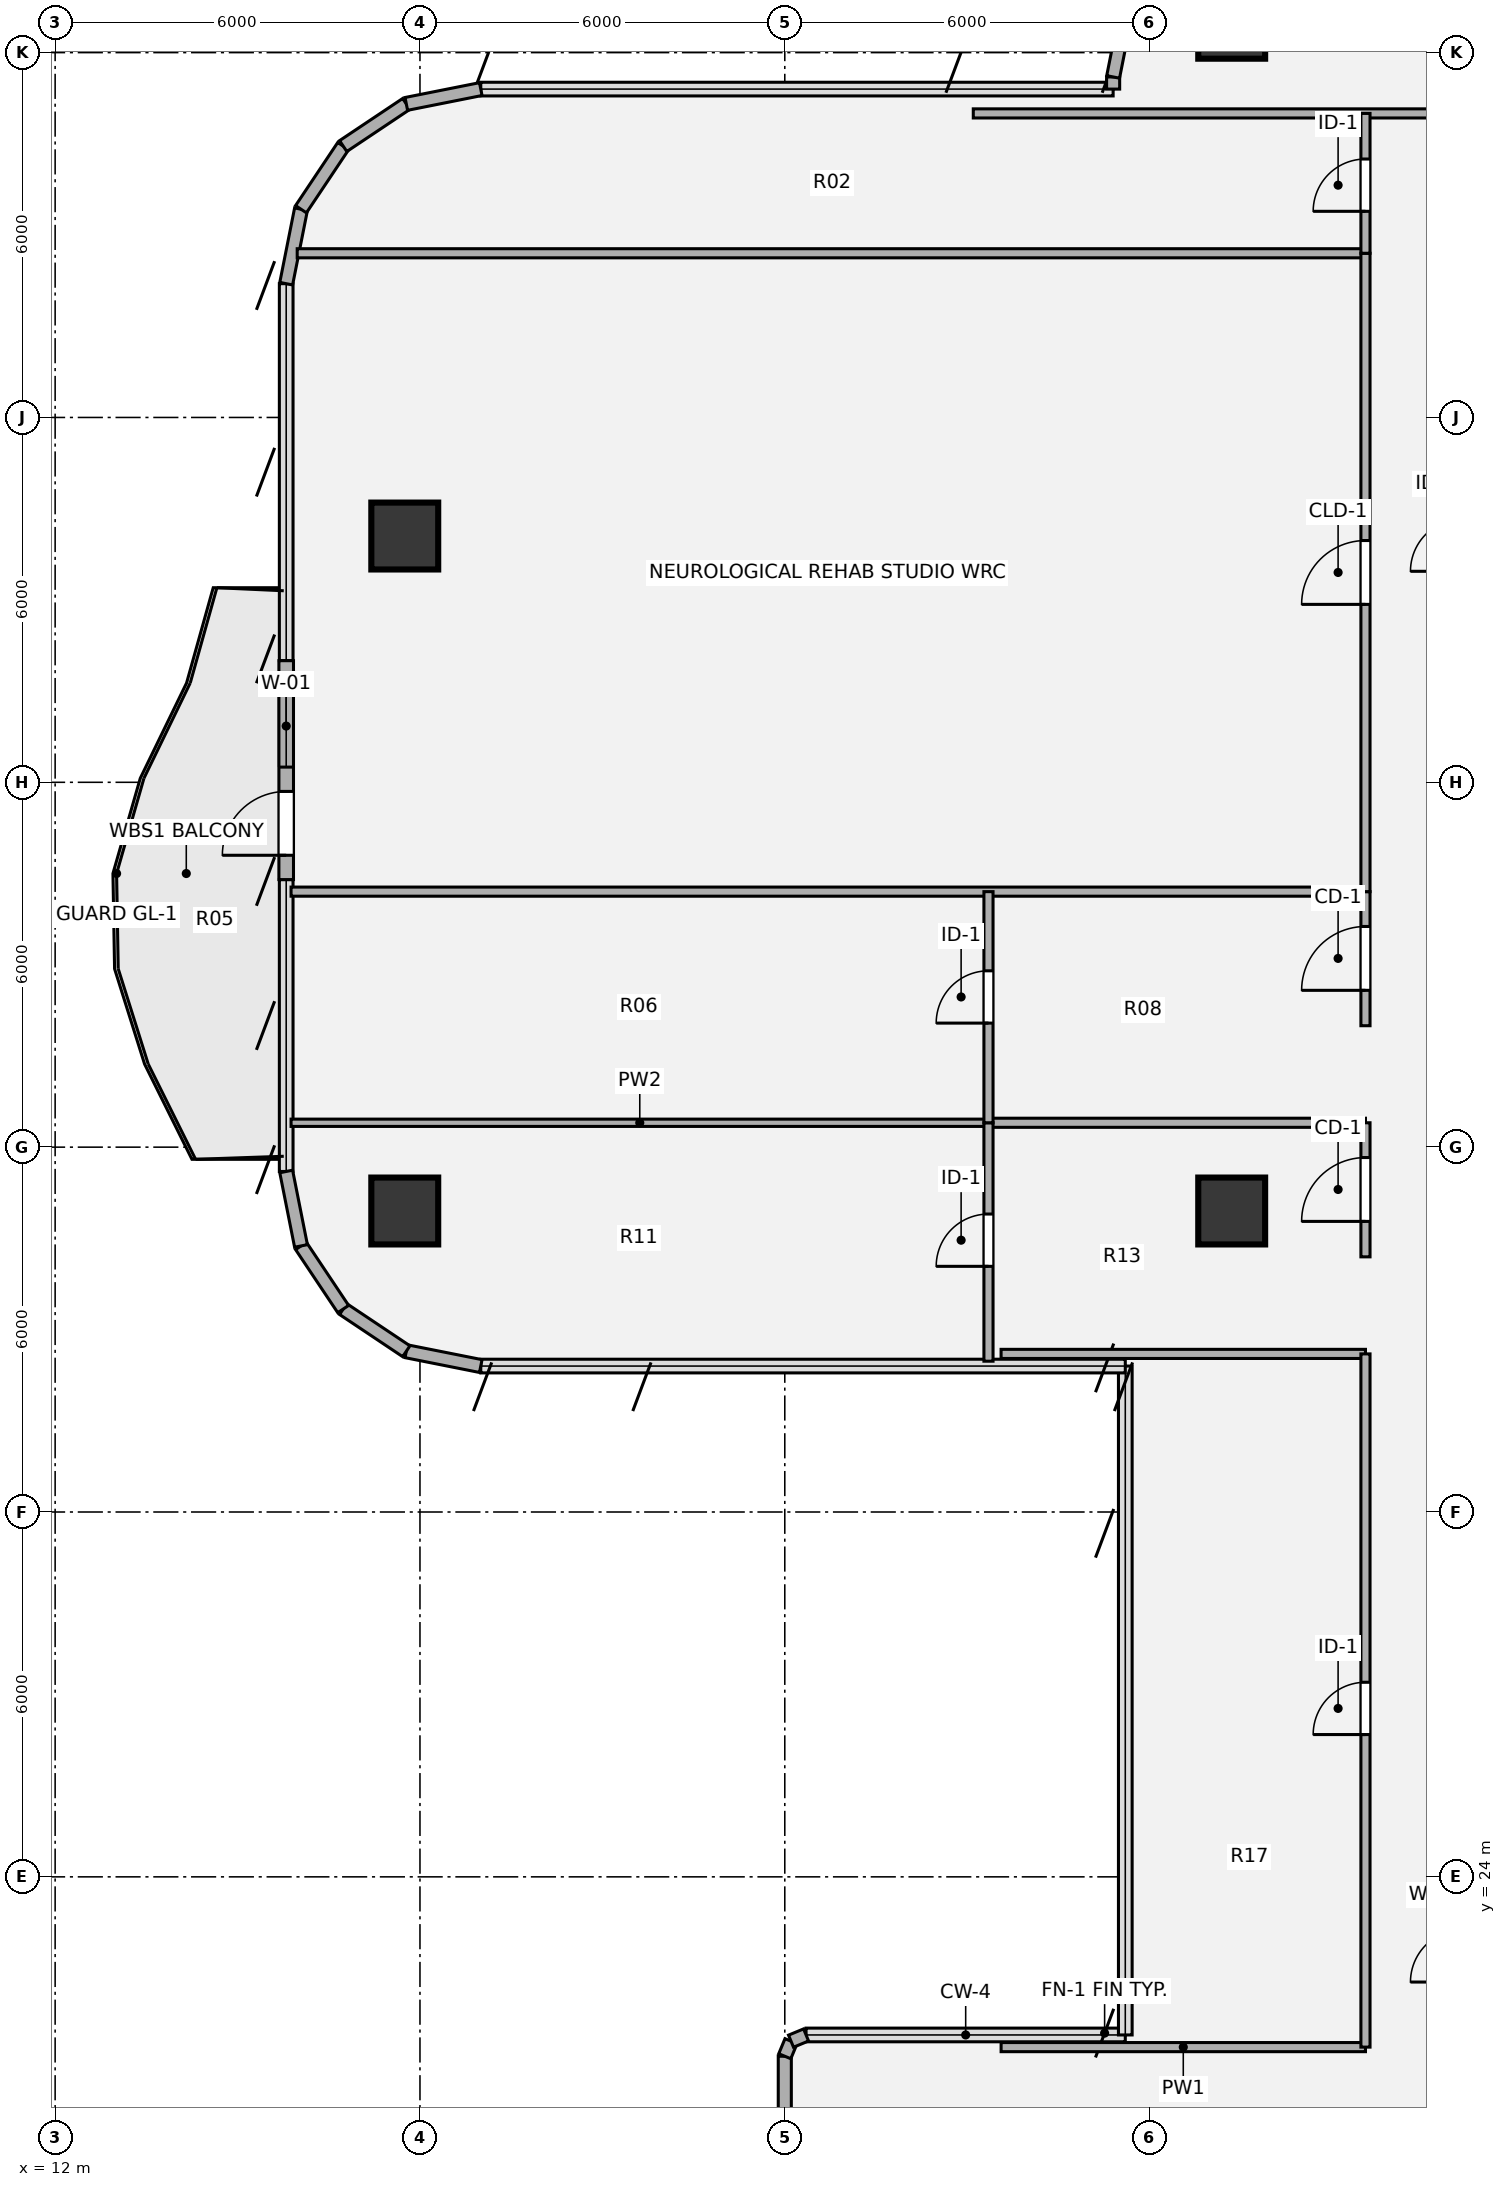
"""IFC4 building model, lengths in metres.
Left out: names, types, materials, properties, quantities, classifications, styles, units other than length and angle.
Written with IfcOpenShell. Run it as: python <this file> out.ifc"""

import sys

from ifc_helpers import new_model, si_unit, direction, frame, frame_2d, origin, origin_2d, place, context, subcontext, project, spatial, rectangle, hollow_circle, extrude, source, transform, mapped, element, fill, save


model = new_model("IFC4")
c1 = context("Model", 3, precision=1e-05, world=origin(), true_north=direction((0.0, 1.0)))
c2 = subcontext(c1, "Body", "Model", "MODEL_VIEW")
j1 = project(units=[si_unit("LENGTHUNIT", "METRE"), si_unit("PLANEANGLEUNIT", "RADIAN")], contexts=[c1])
p1 = place(None, origin())
s1 = spatial("IfcSite", under=j1, at=p1, CompositionType="ELEMENT")
p2 = place(p1, origin())
s2 = spatial("IfcBuilding", under=s1, at=p2, CompositionType="ELEMENT")
p3 = place(p2, frame((0.0, 0.0, 179.1)))
s3 = spatial("IfcBuildingStorey", under=s2, at=p3, CompositionType="ELEMENT", Elevation=179.1)
m1 = source(origin(), c2, "Body", "SweptSolid", [
    extrude(hollow_circle(Radius=0.55, WallThickness=0.04, at=origin_2d()), origin(), (0.0, 0.0, 1.0), 3.78),
])
for number, where, z_axis, x_axis in (
    (1, (17.75, 34.95, 0.0), (0.0, 0.0, 1.0), (1.0, 0.0, 0.0)),
    (2, (17.75, 46.05, 0.0), (0.0, 0.0, 1.0), (1.0, 0.0, 0.0)),
    (3, (31.35, 34.95, 0.0), (0.0, 0.0, 1.0), (1.0, 0.0, 0.0)),
    (4, (31.35, 54.45, 0.0), (0.0, 0.0, 1.0), (1.0, 0.0, 0.0)),
):
    element("IfcColumn", number, at=place(p3, frame(where, z_axis=z_axis, x_axis=x_axis)), inside=s3, PredefinedType="COLUMN", context=c2, shape_type="MappedRepresentation", body=[
        mapped(m1, transform((0.0, 0.0, 0.0), x_axis=(1.0, 0.0, 0.0), y_axis=(0.0, 1.0, 0.0), z_axis=(0.0, 0.0, 1.0), scale=1.0)),
    ])
p4 = place(p3, frame((24.0, 18.355, 0.0), z_axis=(0.0, 0.0, 1.0), x_axis=(0.0, 1.0, 0.0)))
e5 = element("IfcWall", 5, at=p4, inside=s3, PredefinedType="SOLIDWALL", context=c2, shape_type="SweptSolid", body=[
    extrude(rectangle(XDim=2.695, YDim=0.215, at=frame_2d((1.348, 0.0))), origin(), (0.0, 0.0, 1.0), 2.718),
])
p5 = place(p3, frame((24.0, 21.05, 0.0), z_axis=(0.0, 0.0, 1.0), x_axis=(0.382673670509, 0.923883575944, 0.0)))
e6 = element("IfcWall", 6, at=p5, inside=s3, PredefinedType="SOLIDWALL", context=c2, shape_type="SweptSolid", body=[
    extrude(rectangle(XDim=0.268, YDim=0.215, at=frame_2d((0.134, 0.0))), origin(), (0.0, 0.0, 1.0), 3.53),
])
p6 = place(p3, frame((24.103, 21.298, 0.0), z_axis=(0.0, 0.0, 1.0), x_axis=(0.924205486139, 0.381895560841, 0.0)))
e7 = element("IfcWall", 7, at=p6, inside=s3, PredefinedType="SOLIDWALL", context=c2, shape_type="SweptSolid", body=[
    extrude(rectangle(XDim=0.268, YDim=0.215, at=frame_2d((0.134, 0.0))), origin(), (0.0, 0.0, 1.0), 3.53),
])
for number, where, z_axis, x_axis in (
    (8, (19.0, 32.4, 0.0), (0.0, 0.0, 1.0), (-0.981, 0.195, 0.0)),
    (9, (17.775, 32.644, 0.0), (0.0, 0.0, 1.0), (-0.831, 0.556, 0.0)),
    (10, (16.737, 33.337, 0.0), (0.0, 0.0, 1.0), (-0.556, 0.831, 0.0)),
    (11, (16.044, 34.375, 0.0), (0.0, 0.0, 1.0), (-0.195, 0.981, 0.0)),
):
    element("IfcWall", number, at=place(p3, frame(where, z_axis=z_axis, x_axis=x_axis)), inside=s3, PredefinedType="SOLIDWALL", context=c2, shape_type="SweptSolid", body=[
        extrude(rectangle(XDim=1.249, YDim=0.215, at=frame_2d((0.624, 0.0))), origin(), (0.0, 0.0, 1.0), 3.53),
    ])
p7 = place(p3, frame((15.8, 40.4, 0.0), z_axis=(0.0, 0.0, 1.0), x_axis=(0.0, 1.0, 0.0)))
e12 = element("IfcWall", 12, at=p7, inside=s3, PredefinedType="SOLIDWALL", context=c2, shape_type="SweptSolid", body=[
    extrude(rectangle(XDim=3.6, YDim=0.24, at=frame_2d((1.8, 0.0))), origin(), (0.0, 0.0, 1.0), 3.53),
])
p8 = place(p7, frame((0.4, 0.0, 0.0)))
e13 = element("IfcOpeningElement", 13, at=p8, cuts=e12, PredefinedType="OPENING", context=c2, shape_type="SweptSolid", body=[
    extrude(rectangle(XDim=1.05, YDim=2.15, at=origin_2d()), frame((0.525, 0.13, 1.075), z_axis=(0.0, -1.0, 0.0), x_axis=(1.0, 0.0, 0.0)), (0.0, 0.0, 1.0), 0.26),
])
p9 = place(p7, frame((1.85, 0.0, 0.85)))
e14 = element("IfcOpeningElement", 14, at=p9, cuts=e12, PredefinedType="OPENING", context=c2, shape_type="SweptSolid", body=[
    extrude(rectangle(XDim=1.35, YDim=1.35, at=origin_2d()), frame((0.675, 0.13, 0.675), z_axis=(0.0, -1.0, 0.0), x_axis=(1.0, 0.0, 0.0)), (0.0, 0.0, 1.0), 0.26),
])
for number, where, z_axis, x_axis in (
    (15, (15.8, 50.2, 0.0), (0.0, 0.0, 1.0), (0.195, 0.981, 0.0)),
    (16, (16.044, 51.425, 0.0), (0.0, 0.0, 1.0), (0.556, 0.831, 0.0)),
    (17, (16.737, 52.463, 0.0), (0.0, 0.0, 1.0), (0.831, 0.556, 0.0)),
    (18, (17.775, 53.156, 0.0), (0.0, 0.0, 1.0), (0.981, 0.195, 0.0)),
):
    element("IfcWall", number, at=place(p3, frame(where, z_axis=z_axis, x_axis=x_axis)), inside=s3, PredefinedType="SOLIDWALL", context=c2, shape_type="SweptSolid", body=[
        extrude(rectangle(XDim=1.249, YDim=0.215, at=frame_2d((0.624, 0.0))), origin(), (0.0, 0.0, 1.0), 3.53),
    ])
p10 = place(p3, frame((29.4, 53.4, 0.0), z_axis=(0.0, 0.0, 1.0), x_axis=(0.0, 1.0, 0.0)))
e19 = element("IfcWall", 19, at=p10, inside=s3, PredefinedType="SOLIDWALL", context=c2, shape_type="SweptSolid", body=[
    extrude(rectangle(XDim=0.2, YDim=0.215, at=frame_2d((0.1, 0.0))), origin(), (0.0, 0.0, 1.0), 3.53),
])
p11 = place(p3, frame((29.4, 53.6, 0.0), z_axis=(0.0, 0.0, 1.0), x_axis=(0.195127417394, 0.980777900945, 0.0)))
e20 = element("IfcWall", 20, at=p11, inside=s3, PredefinedType="SOLIDWALL", context=c2, shape_type="SweptSolid", body=[
    extrude(rectangle(XDim=1.092, YDim=0.215, at=frame_2d((0.546, 0.0))), origin(), (0.0, 0.0, 1.0), 3.53),
])
p12 = place(p3, frame((27.558, 21.2, 0.0), z_axis=(0.0, 0.0, 1.0), x_axis=(1.0, 0.0, 0.0)))
e21 = element("IfcWall", 21, at=p12, inside=s3, PredefinedType="PARTITIONING", context=c2, shape_type="SweptSolid", body=[
    extrude(rectangle(XDim=5.992, YDim=0.15, at=frame_2d((2.996, 0.0))), origin(), (0.0, 0.0, 1.0), 3.5),
])
p13 = place(p3, frame((27.557, 32.6, 0.0), z_axis=(0.0, 0.0, 1.0), x_axis=(1.0, 0.0, 0.0)))
e22 = element("IfcWall", 22, at=p13, inside=s3, PredefinedType="PARTITIONING", context=c2, shape_type="SweptSolid", body=[
    extrude(rectangle(XDim=5.993, YDim=0.15, at=frame_2d((2.997, 0.0))), origin(), (0.0, 0.0, 1.0), 3.5),
])
p14 = place(p3, frame((15.88, 36.401, 0.0), z_axis=(0.0, 0.0, 1.0), x_axis=(1.0, 0.0, 0.0)))
e23 = element("IfcWall", 23, at=p14, inside=s3, PredefinedType="PARTITIONING", context=c2, shape_type="SweptSolid", body=[
    extrude(rectangle(XDim=11.47, YDim=0.12, at=frame_2d((5.735, 0.0))), origin(), (0.0, 0.0, 1.0), 2.982),
])
p15 = place(p3, frame((27.35, 36.401, 0.0), z_axis=(0.0, 0.0, 1.0), x_axis=(1.0, 0.0, 0.0)))
e24 = element("IfcWall", 24, at=p15, inside=s3, PredefinedType="PARTITIONING", context=c2, shape_type="SweptSolid", body=[
    extrude(rectangle(XDim=6.2, YDim=0.15, at=frame_2d((3.1, 0.0))), origin(), (0.0, 0.0, 1.0), 2.982),
])
p16 = place(p3, frame((15.88, 40.202, 0.0), z_axis=(0.0, 0.0, 1.0), x_axis=(1.0, 0.0, 0.0)))
e25 = element("IfcWall", 25, at=p16, inside=s3, PredefinedType="PARTITIONING", context=c2, shape_type="SweptSolid", body=[
    extrude(rectangle(XDim=17.67, YDim=0.15, at=frame_2d((8.835, 0.0))), origin(), (0.0, 0.0, 1.0), 2.982),
])
p17 = place(p3, frame((15.981, 50.7, 0.0), z_axis=(0.0, 0.0, 1.0), x_axis=(1.0, 0.0, 0.0)))
e26 = element("IfcWall", 26, at=p17, inside=s3, PredefinedType="PARTITIONING", context=c2, shape_type="SweptSolid", body=[
    extrude(rectangle(XDim=17.569, YDim=0.15, at=frame_2d((8.785, 0.0))), origin(), (0.0, 0.0, 1.0), 3.308),
])
p18 = place(p3, frame((27.1, 53.0, 0.0), z_axis=(0.0, 0.0, 1.0), x_axis=(1.0, 0.0, 0.0)))
e27 = element("IfcWall", 27, at=p18, inside=s3, PredefinedType="PARTITIONING", context=c2, shape_type="SweptSolid", body=[
    extrude(rectangle(XDim=17.8, YDim=0.15, at=frame_2d((8.9, 0.0))), origin(), (0.0, 0.0, 1.0), 3.308),
])
p19 = place(p18, frame((8.375, 0.0, 0.0)))
e28 = element("IfcOpeningElement", 28, at=p19, cuts=e27, PredefinedType="OPENING", context=c2, shape_type="SweptSolid", body=[
    extrude(rectangle(XDim=1.05, YDim=2.1, at=origin_2d()), frame((0.525, 0.085, 1.05), z_axis=(0.0, -1.0, 0.0), x_axis=(1.0, 0.0, 0.0)), (0.0, 0.0, 1.0), 0.17),
])
p20 = place(p3, frame((27.35, 32.48, 0.0), z_axis=(0.0, 0.0, 1.0), x_axis=(0.0, 1.0, 0.0)))
e29 = element("IfcWall", 29, at=p20, inside=s3, PredefinedType="PARTITIONING", context=c2, shape_type="SweptSolid", body=[
    extrude(rectangle(XDim=3.921, YDim=0.15, at=frame_2d((1.96, 0.0))), origin(), (0.0, 0.0, 1.0), 3.5),
])
p21 = place(p20, frame((1.56, 0.0, 0.0)))
e30 = element("IfcOpeningElement", 30, at=p21, cuts=e29, PredefinedType="OPENING", context=c2, shape_type="SweptSolid", body=[
    extrude(rectangle(XDim=0.86, YDim=2.1, at=origin_2d()), frame((0.43, 0.085, 1.05), z_axis=(0.0, -1.0, 0.0), x_axis=(1.0, 0.0, 0.0)), (0.0, 0.0, 1.0), 0.17),
])
p22 = place(p3, frame((27.35, 36.401, 0.0), z_axis=(0.0, 0.0, 1.0), x_axis=(0.0, 1.0, 0.0)))
e31 = element("IfcWall", 31, at=p22, inside=s3, PredefinedType="PARTITIONING", context=c2, shape_type="SweptSolid", body=[
    extrude(rectangle(XDim=3.801, YDim=0.15, at=frame_2d((1.9, 0.0))), origin(), (0.0, 0.0, 1.0), 3.5),
])
p23 = place(p22, frame((1.639, 0.0, 0.0)))
e32 = element("IfcOpeningElement", 32, at=p23, cuts=e31, PredefinedType="OPENING", context=c2, shape_type="SweptSolid", body=[
    extrude(rectangle(XDim=0.86, YDim=2.1, at=origin_2d()), frame((0.43, 0.085, 1.05), z_axis=(0.0, -1.0, 0.0), x_axis=(1.0, 0.0, 0.0)), (0.0, 0.0, 1.0), 0.17),
])
p24 = place(p3, frame((33.55, 21.2, 0.0), z_axis=(0.0, 0.0, 1.0), x_axis=(0.0, 1.0, 0.0)))
e33 = element("IfcWall", 33, at=p24, inside=s3, PredefinedType="PARTITIONING", context=c2, shape_type="SweptSolid", body=[
    extrude(rectangle(XDim=11.4, YDim=0.15, at=frame_2d((5.7, 0.0))), origin(), (0.0, 0.0, 1.0), 3.5),
])
p25 = place(p24, frame((5.14, 0.0, 0.0)))
e34 = element("IfcOpeningElement", 34, at=p25, cuts=e33, PredefinedType="OPENING", context=c2, shape_type="SweptSolid", body=[
    extrude(rectangle(XDim=0.86, YDim=2.1, at=origin_2d()), frame((0.43, 0.085, 1.05), z_axis=(0.0, -1.0, 0.0), x_axis=(1.0, 0.0, 0.0)), (0.0, 0.0, 1.0), 0.17),
])
p26 = place(p3, frame((33.55, 34.196, 0.0), z_axis=(0.0, 0.0, 1.0), x_axis=(0.0, 1.0, 0.0)))
e35 = element("IfcWall", 35, at=p26, inside=s3, PredefinedType="PARTITIONING", context=c2, shape_type="SweptSolid", body=[
    extrude(rectangle(XDim=2.205, YDim=0.15, at=frame_2d((1.103, 0.0))), origin(), (0.0, 0.0, 1.0), 3.5),
])
p27 = place(p26, frame((0.583, 0.0, 0.0)))
e36 = element("IfcOpeningElement", 36, at=p27, cuts=e35, PredefinedType="OPENING", context=c2, shape_type="SweptSolid", body=[
    extrude(rectangle(XDim=1.05, YDim=2.1, at=origin_2d()), frame((0.525, 0.085, 1.05), z_axis=(0.0, -1.0, 0.0), x_axis=(1.0, 0.0, 0.0)), (0.0, 0.0, 1.0), 0.17),
])
p28 = place(p3, frame((33.55, 37.997, 0.0), z_axis=(0.0, 0.0, 1.0), x_axis=(0.0, 1.0, 0.0)))
e37 = element("IfcWall", 37, at=p28, inside=s3, PredefinedType="PARTITIONING", context=c2, shape_type="SweptSolid", body=[
    extrude(rectangle(XDim=2.205, YDim=0.15, at=frame_2d((1.103, 0.0))), origin(), (0.0, 0.0, 1.0), 3.5),
])
p29 = place(p28, frame((0.582, 0.0, 0.0)))
e38 = element("IfcOpeningElement", 38, at=p29, cuts=e37, PredefinedType="OPENING", context=c2, shape_type="SweptSolid", body=[
    extrude(rectangle(XDim=1.05, YDim=2.1, at=origin_2d()), frame((0.525, 0.085, 1.05), z_axis=(0.0, -1.0, 0.0), x_axis=(1.0, 0.0, 0.0)), (0.0, 0.0, 1.0), 0.17),
])
p30 = place(p3, frame((33.55, 40.202, 0.0), z_axis=(0.0, 0.0, 1.0), x_axis=(0.0, 1.0, 0.0)))
e39 = element("IfcWall", 39, at=p30, inside=s3, PredefinedType="PARTITIONING", context=c2, shape_type="SweptSolid", body=[
    extrude(rectangle(XDim=10.498, YDim=0.15, at=frame_2d((5.249, 0.0))), origin(), (0.0, 0.0, 1.0), 3.5),
])
p31 = place(p30, frame((4.724, 0.0, 0.0)))
e40 = element("IfcOpeningElement", 40, at=p31, cuts=e39, PredefinedType="OPENING", context=c2, shape_type="SweptSolid", body=[
    extrude(rectangle(XDim=1.05, YDim=2.1, at=origin_2d()), frame((0.525, 0.085, 1.05), z_axis=(0.0, -1.0, 0.0), x_axis=(1.0, 0.0, 0.0)), (0.0, 0.0, 1.0), 0.17),
])
p32 = place(p3, frame((33.55, 50.7, 0.0), z_axis=(0.0, 0.0, 1.0), x_axis=(0.0, 1.0, 0.0)))
e41 = element("IfcWall", 41, at=p32, inside=s3, PredefinedType="PARTITIONING", context=c2, shape_type="SweptSolid", body=[
    extrude(rectangle(XDim=2.3, YDim=0.15, at=frame_2d((1.15, 0.0))), origin(), (0.0, 0.0, 1.0), 3.5),
])
p33 = place(p32, frame((0.69, 0.0, 0.0)))
e42 = element("IfcOpeningElement", 42, at=p33, cuts=e41, PredefinedType="OPENING", context=c2, shape_type="SweptSolid", body=[
    extrude(rectangle(XDim=0.86, YDim=2.1, at=origin_2d()), frame((0.43, 0.085, 1.05), z_axis=(0.0, -1.0, 0.0), x_axis=(1.0, 0.0, 0.0)), (0.0, 0.0, 1.0), 0.17),
])
m2 = source(origin(), c2, "Body", "SweptSolid", [
    extrude(rectangle(XDim=1.05, YDim=2.15, at=origin_2d()), frame((0.525, 0.025, 1.075), z_axis=(0.0, -1.0, 0.0), x_axis=(1.0, 0.0, 0.0)), (0.0, 0.0, 1.0), 0.05),
])
p34 = place(p8, origin())
e43 = element("IfcDoor", 43, at=p34, inside=s3, OperationType="SINGLE_SWING_LEFT", PredefinedType="DOOR", context=c2, shape_type="MappedRepresentation", body=[
    mapped(m2, transform((0.0, 0.0, 0.0), x_axis=(1.0, 0.0, 0.0), y_axis=(0.0, 1.0, 0.0), z_axis=(0.0, 0.0, 1.0), scale=1.0)),
])
fill(e13, e43)
m3 = source(origin(), c2, "Body", "SweptSolid", [
    extrude(rectangle(XDim=1.35, YDim=1.35, at=origin_2d()), frame((0.675, 0.03, 0.675), z_axis=(0.0, -1.0, 0.0), x_axis=(1.0, 0.0, 0.0)), (0.0, 0.0, 1.0), 0.06),
])
p35 = place(p9, origin())
e44 = element("IfcWindow", 44, at=p35, inside=s3, PartitioningType="SINGLE_PANEL", PredefinedType="WINDOW", context=c2, shape_type="MappedRepresentation", body=[
    mapped(m3, transform((0.0, 0.0, 0.0), x_axis=(1.0, 0.0, 0.0), y_axis=(0.0, 1.0, 0.0), z_axis=(0.0, 0.0, 1.0), scale=1.0)),
])
fill(e14, e44)
m4 = source(origin(), c2, "Body", "SweptSolid", [
    extrude(rectangle(XDim=0.86, YDim=2.1, at=origin_2d()), frame((0.43, 0.025, 1.05), z_axis=(0.0, -1.0, 0.0), x_axis=(1.0, 0.0, 0.0)), (0.0, 0.0, 1.0), 0.05),
])
p36 = place(p21, origin())
e45 = element("IfcDoor", 45, at=p36, inside=s3, OperationType="SINGLE_SWING_LEFT", PredefinedType="DOOR", context=c2, shape_type="MappedRepresentation", body=[
    mapped(m4, transform((0.0, 0.0, 0.0), x_axis=(1.0, 0.0, 0.0), y_axis=(0.0, 1.0, 0.0), z_axis=(0.0, 0.0, 1.0), scale=1.0)),
])
fill(e30, e45)
p37 = place(p23, origin())
e46 = element("IfcDoor", 46, at=p37, inside=s3, OperationType="SINGLE_SWING_LEFT", PredefinedType="DOOR", context=c2, shape_type="MappedRepresentation", body=[
    mapped(m4, transform((0.0, 0.0, 0.0), x_axis=(1.0, 0.0, 0.0), y_axis=(0.0, 1.0, 0.0), z_axis=(0.0, 0.0, 1.0), scale=1.0)),
])
fill(e32, e46)
p38 = place(p25, origin())
e47 = element("IfcDoor", 47, at=p38, inside=s3, OperationType="SINGLE_SWING_LEFT", PredefinedType="DOOR", context=c2, shape_type="MappedRepresentation", body=[
    mapped(m4, transform((0.0, 0.0, 0.0), x_axis=(1.0, 0.0, 0.0), y_axis=(0.0, 1.0, 0.0), z_axis=(0.0, 0.0, 1.0), scale=1.0)),
])
fill(e34, e47)
m5 = source(origin(), c2, "Body", "SweptSolid", [
    extrude(rectangle(XDim=1.05, YDim=2.1, at=origin_2d()), frame((0.525, 0.025, 1.05), z_axis=(0.0, -1.0, 0.0), x_axis=(1.0, 0.0, 0.0)), (0.0, 0.0, 1.0), 0.05),
])
p39 = place(p27, origin())
e48 = element("IfcDoor", 48, at=p39, inside=s3, OperationType="SINGLE_SWING_LEFT", PredefinedType="DOOR", context=c2, shape_type="MappedRepresentation", body=[
    mapped(m5, transform((0.0, 0.0, 0.0), x_axis=(1.0, 0.0, 0.0), y_axis=(0.0, 1.0, 0.0), z_axis=(0.0, 0.0, 1.0), scale=1.0)),
])
fill(e36, e48)
p40 = place(p29, origin())
e49 = element("IfcDoor", 49, at=p40, inside=s3, OperationType="SINGLE_SWING_LEFT", PredefinedType="DOOR", context=c2, shape_type="MappedRepresentation", body=[
    mapped(m5, transform((0.0, 0.0, 0.0), x_axis=(1.0, 0.0, 0.0), y_axis=(0.0, 1.0, 0.0), z_axis=(0.0, 0.0, 1.0), scale=1.0)),
])
fill(e38, e49)
m6 = source(origin(), c2, "Body", "SweptSolid", [
    extrude(rectangle(XDim=1.05, YDim=2.1, at=origin_2d()), frame((0.525, 0.025, 1.05), z_axis=(0.0, -1.0, 0.0), x_axis=(1.0, 0.0, 0.0)), (0.0, 0.0, 1.0), 0.05),
])
p41 = place(p31, origin())
e50 = element("IfcDoor", 50, at=p41, inside=s3, OperationType="SINGLE_SWING_LEFT", PredefinedType="DOOR", context=c2, shape_type="MappedRepresentation", body=[
    mapped(m6, transform((0.0, 0.0, 0.0), x_axis=(1.0, 0.0, 0.0), y_axis=(0.0, 1.0, 0.0), z_axis=(0.0, 0.0, 1.0), scale=1.0)),
])
fill(e40, e50)
p42 = place(p33, origin())
e51 = element("IfcDoor", 51, at=p42, inside=s3, OperationType="SINGLE_SWING_LEFT", PredefinedType="DOOR", context=c2, shape_type="MappedRepresentation", body=[
    mapped(m4, transform((0.0, 0.0, 0.0), x_axis=(1.0, 0.0, 0.0), y_axis=(0.0, 1.0, 0.0), z_axis=(0.0, 0.0, 1.0), scale=1.0)),
])
fill(e42, e51)
save(model, sys.argv[1])
